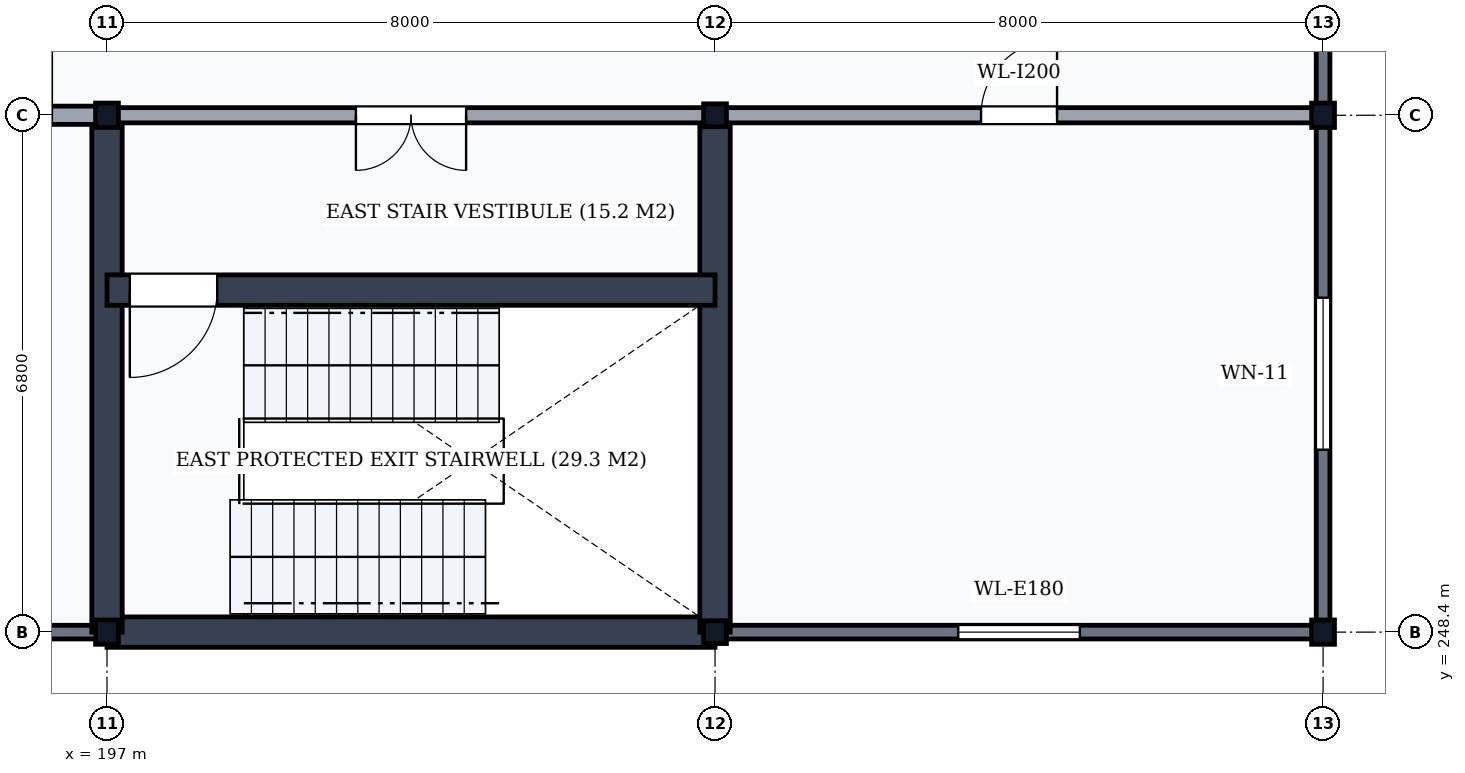
"""IFC4 building model, lengths in metres.
Left out: names, types, materials, properties, quantities, classifications, styles, units other than length and angle.
Written with IfcOpenShell. Run it as: python <this file> out.ifc"""

import sys

from ifc_helpers import new_model, si_unit, direction, frame, frame_2d, origin, origin_2d, place, context, subcontext, project, spatial, rectangle, i_section, extrude, element, fill, save


model = new_model("IFC4")
c1 = context("Model", 3, precision=1e-05, world=origin(), true_north=direction((0.0, 1.0)))
c2 = subcontext(c1, "Body", "Model", "MODEL_VIEW")
j1 = project(units=[si_unit("LENGTHUNIT", "METRE"), si_unit("PLANEANGLEUNIT", "RADIAN")], contexts=[c1])
p1 = place(None, origin())
s1 = spatial("IfcSite", under=j1, at=p1, CompositionType="ELEMENT")
p2 = place(p1, origin())
s2 = spatial("IfcBuilding", under=s1, at=p2, CompositionType="ELEMENT")
p3 = place(p2, frame((0.0, 0.0, 67.8)))
s3 = spatial("IfcBuildingStorey", under=s2, at=p3, CompositionType="ELEMENT", Elevation=67.8)
for number, where, z_axis, x_axis in (
    (1, (197.0, 248.4, 0.0), (0.0, 0.0, 1.0), (1.0, 0.0, 0.0)),
    (2, (197.0, 255.2, 0.0), (0.0, 0.0, 1.0), (1.0, 0.0, 0.0)),
):
    element("IfcColumn", number, at=place(p3, frame(where, z_axis=z_axis, x_axis=x_axis)), inside=s3, PredefinedType="COLUMN", context=c2, shape_type="SweptSolid", body=[
        extrude(i_section(OverallWidth=0.3, OverallDepth=0.32, WebThickness=0.011, FlangeThickness=0.021, FilletRadius=0.027, at=origin_2d()), origin(), (0.0, 0.0, 1.0), 4.5),
    ])
for number, where, z_axis, x_axis in (
    (3, (205.0, 248.4, 0.0), (0.0, 0.0, 1.0), (1.0, 0.0, 0.0)),
    (4, (205.0, 255.2, 0.0), (0.0, 0.0, 1.0), (1.0, 0.0, 0.0)),
):
    element("IfcColumn", number, at=place(p3, frame(where, z_axis=z_axis, x_axis=x_axis)), inside=s3, PredefinedType="COLUMN", context=c2, shape_type="SweptSolid", body=[
        extrude(i_section(OverallWidth=0.3, OverallDepth=0.3, WebThickness=0.011, FlangeThickness=0.019, FilletRadius=0.027, at=origin_2d()), origin(), (0.0, 0.0, 1.0), 4.5),
    ])
for number, where, z_axis, x_axis in (
    (5, (213.0, 248.4, 0.0), (0.0, 0.0, 1.0), (1.0, 0.0, 0.0)),
    (6, (213.0, 255.2, 0.0), (0.0, 0.0, 1.0), (1.0, 0.0, 0.0)),
):
    element("IfcColumn", number, at=place(p3, frame(where, z_axis=z_axis, x_axis=x_axis)), inside=s3, PredefinedType="COLUMN", context=c2, shape_type="SweptSolid", body=[
        extrude(i_section(OverallWidth=0.3, OverallDepth=0.32, WebThickness=0.011, FlangeThickness=0.021, FilletRadius=0.027, at=origin_2d()), origin(), (0.0, 0.0, 1.0), 4.5),
    ])
p4 = place(p3, frame((189.006, 248.4, 0.0), z_axis=(0.0, 0.0, 1.0), x_axis=(1.0, 0.0, 0.0)))
e7 = element("IfcWall", 7, at=p4, inside=s3, PredefinedType="SOLIDWALL", context=c2, shape_type="SweptSolid", body=[
    extrude(rectangle(XDim=7.988, YDim=0.18, at=frame_2d((3.994, 0.0))), origin(), (0.0, 0.0, 1.0), 3.988),
])
p5 = place(p3, frame((205.006, 248.4, 0.0), z_axis=(0.0, 0.0, 1.0), x_axis=(1.0, 0.0, 0.0)))
e8 = element("IfcWall", 8, at=p5, inside=s3, PredefinedType="SOLIDWALL", context=c2, shape_type="SweptSolid", body=[
    extrude(rectangle(XDim=7.988, YDim=0.18, at=frame_2d((3.994, 0.0))), origin(), (0.0, 0.0, 1.0), 3.988),
])
p6 = place(p5, frame((3.194, 0.0, 0.95)))
e9 = element("IfcOpeningElement", 9, at=p6, cuts=e8, PredefinedType="OPENING", context=c2, shape_type="SweptSolid", body=[
    extrude(rectangle(XDim=1.6, YDim=2.0, at=frame_2d((0.8, 1.0))), frame((0.0, 0.105, 0.0), z_axis=(0.0, -1.0, 0.0), x_axis=(1.0, 0.0, 0.0)), (0.0, 0.0, 1.0), 0.21),
])
p7 = place(p3, frame((213.0, 248.406, 0.0), z_axis=(0.0, 0.0, 1.0), x_axis=(0.0, 1.0, 0.0)))
e10 = element("IfcWall", 10, at=p7, inside=s3, PredefinedType="SOLIDWALL", context=c2, shape_type="SweptSolid", body=[
    extrude(rectangle(XDim=6.788, YDim=0.18, at=frame_2d((3.394, 0.0))), origin(), (0.0, 0.0, 1.0), 4.068),
])
p8 = place(p7, frame((2.394, 0.0, 0.95)))
e11 = element("IfcOpeningElement", 11, at=p8, cuts=e10, PredefinedType="OPENING", context=c2, shape_type="SweptSolid", body=[
    extrude(rectangle(XDim=2.0, YDim=2.1, at=frame_2d((1.0, 1.05))), frame((0.0, 0.105, 0.0), z_axis=(0.0, -1.0, 0.0), x_axis=(1.0, 0.0, 0.0)), (0.0, 0.0, 1.0), 0.21),
])
p9 = place(p3, frame((213.0, 255.206, 0.0), z_axis=(0.0, 0.0, 1.0), x_axis=(0.0, 1.0, 0.0)))
e12 = element("IfcWall", 12, at=p9, inside=s3, PredefinedType="SOLIDWALL", context=c2, shape_type="SweptSolid", body=[
    extrude(rectangle(XDim=7.588, YDim=0.18, at=frame_2d((3.794, 0.0))), origin(), (0.0, 0.0, 1.0), 4.028),
])
p10 = place(p3, frame((197.0, 248.4, 0.0), z_axis=(0.0, 0.0, 1.0), x_axis=(1.0, 0.0, 0.0)))
e13 = element("IfcWall", 13, at=p10, inside=s3, PredefinedType="SHEAR", context=c2, shape_type="SweptSolid", body=[
    extrude(rectangle(XDim=8.0, YDim=0.4, at=frame_2d((4.0, 0.0))), origin(), (0.0, 0.0, 1.0), 4.3),
])
for number, where, z_axis, x_axis in (
    (14, (197.0, 248.4, 0.0), (0.0, 0.0, 1.0), (0.0, 1.0, 0.0)),
    (15, (205.0, 248.4, 0.0), (0.0, 0.0, 1.0), (0.0, 1.0, 0.0)),
):
    element("IfcWall", number, at=place(p3, frame(where, z_axis=z_axis, x_axis=x_axis)), inside=s3, PredefinedType="SHEAR", context=c2, shape_type="SweptSolid", body=[
        extrude(rectangle(XDim=6.8, YDim=0.4, at=frame_2d((3.4, 0.0))), origin(), (0.0, 0.0, 1.0), 4.3),
    ])
p11 = place(p3, frame((197.0, 252.9, 0.0), z_axis=(0.0, 0.0, 1.0), x_axis=(1.0, 0.0, 0.0)))
e16 = element("IfcWall", 16, at=p11, inside=s3, PredefinedType="SHEAR", context=c2, shape_type="SweptSolid", body=[
    extrude(rectangle(XDim=8.0, YDim=0.4, at=frame_2d((4.0, 0.0))), origin(), (0.0, 0.0, 1.0), 4.3),
])
p12 = place(p11, frame((0.3, 0.0, 0.0)))
e17 = element("IfcOpeningElement", 17, at=p12, cuts=e16, PredefinedType="OPENING", context=c2, shape_type="SweptSolid", body=[
    extrude(rectangle(XDim=1.15, YDim=2.15, at=frame_2d((0.575, 1.075))), frame((0.0, 0.215, 0.0), z_axis=(0.0, -1.0, 0.0), x_axis=(1.0, 0.0, 0.0)), (0.0, 0.0, 1.0), 0.43),
])
p13 = place(p3, frame((197.0, 255.2, 0.0), z_axis=(0.0, 0.0, 1.0), x_axis=(1.0, 0.0, 0.0)))
e18 = element("IfcWall", 18, at=p13, inside=s3, PredefinedType="PARTITIONING", context=c2, shape_type="SweptSolid", body=[
    extrude(rectangle(XDim=8.0, YDim=0.2, at=frame_2d((4.0, 0.0))), origin(), (0.0, 0.0, 1.0), 3.798),
])
p14 = place(p13, frame((3.275, 0.0, 0.0)))
e19 = element("IfcOpeningElement", 19, at=p14, cuts=e18, PredefinedType="OPENING", context=c2, shape_type="SweptSolid", body=[
    extrude(rectangle(XDim=1.45, YDim=2.2, at=frame_2d((0.725, 1.1))), frame((0.0, 0.115, 0.0), z_axis=(0.0, -1.0, 0.0), x_axis=(1.0, 0.0, 0.0)), (0.0, 0.0, 1.0), 0.23),
])
p15 = place(p3, frame((189.0, 255.2, 0.0), z_axis=(0.0, 0.0, 1.0), x_axis=(1.0, 0.0, 0.0)))
e20 = element("IfcWall", 20, at=p15, inside=s3, PredefinedType="PARTITIONING", context=c2, shape_type="SweptSolid", body=[
    extrude(rectangle(XDim=8.0, YDim=0.24, at=frame_2d((4.0, 0.0))), origin(), (0.0, 0.0, 1.0), 3.798),
])
p16 = place(p15, frame((1.05, 0.0, 0.0)))
e21 = element("IfcOpeningElement", 21, at=p16, cuts=e20, PredefinedType="OPENING", context=c2, shape_type="SweptSolid", body=[
    extrude(rectangle(XDim=1.0, YDim=2.1, at=frame_2d((0.5, 1.05))), frame((0.0, 0.135, 0.0), z_axis=(0.0, -1.0, 0.0), x_axis=(1.0, 0.0, 0.0)), (0.0, 0.0, 1.0), 0.27),
])
p17 = place(p15, frame((3.6, 0.0, 0.0)))
e22 = element("IfcOpeningElement", 22, at=p17, cuts=e20, PredefinedType="OPENING", context=c2, shape_type="SweptSolid", body=[
    extrude(rectangle(XDim=1.5, YDim=2.25, at=frame_2d((0.75, 1.125))), frame((0.0, 0.135, 0.0), z_axis=(0.0, -1.0, 0.0), x_axis=(1.0, 0.0, 0.0)), (0.0, 0.0, 1.0), 0.27),
])
p18 = place(p15, frame((6.425, 0.0, 0.0)))
e23 = element("IfcOpeningElement", 23, at=p18, cuts=e20, PredefinedType="OPENING", context=c2, shape_type="SweptSolid", body=[
    extrude(rectangle(XDim=0.85, YDim=2.1, at=frame_2d((0.425, 1.05))), frame((0.0, 0.135, 0.0), z_axis=(0.0, -1.0, 0.0), x_axis=(1.0, 0.0, 0.0)), (0.0, 0.0, 1.0), 0.27),
])
p19 = place(p3, frame((205.0, 255.2, 0.0), z_axis=(0.0, 0.0, 1.0), x_axis=(1.0, 0.0, 0.0)))
e24 = element("IfcWall", 24, at=p19, inside=s3, PredefinedType="PARTITIONING", context=c2, shape_type="SweptSolid", body=[
    extrude(rectangle(XDim=8.0, YDim=0.2, at=frame_2d((4.0, 0.0))), origin(), (0.0, 0.0, 1.0), 3.798),
])
p20 = place(p19, frame((3.5, 0.0, 0.0)))
e25 = element("IfcOpeningElement", 25, at=p20, cuts=e24, PredefinedType="OPENING", context=c2, shape_type="SweptSolid", body=[
    extrude(rectangle(XDim=1.0, YDim=2.1, at=frame_2d((0.5, 1.05))), frame((0.0, 0.115, 0.0), z_axis=(0.0, -1.0, 0.0), x_axis=(1.0, 0.0, 0.0)), (0.0, 0.0, 1.0), 0.23),
])
p21 = place(p6, origin())
e26 = element("IfcWindow", 26, at=p21, inside=s3, PartitioningType="SINGLE_PANEL", PredefinedType="WINDOW", context=c2, shape_type="SweptSolid", body=[
    extrude(rectangle(XDim=1.6, YDim=2.0, at=frame_2d((0.8, 1.0))), frame((0.0, 0.03, 0.0), z_axis=(0.0, -1.0, 0.0), x_axis=(1.0, 0.0, 0.0)), (0.0, 0.0, 1.0), 0.06),
])
fill(e9, e26)
p22 = place(p8, origin())
e27 = element("IfcWindow", 27, at=p22, inside=s3, PartitioningType="DOUBLE_PANEL_VERTICAL", PredefinedType="WINDOW", context=c2, shape_type="SweptSolid", body=[
    extrude(rectangle(XDim=2.0, YDim=2.1, at=frame_2d((1.0, 1.05))), frame((0.0, 0.03, 0.0), z_axis=(0.0, -1.0, 0.0), x_axis=(1.0, 0.0, 0.0)), (0.0, 0.0, 1.0), 0.06),
])
fill(e11, e27)
p23 = place(p12, frame((1.15, 0.0, 0.0), z_axis=(0.0, 0.0, 1.0), x_axis=(-1.0, 0.0, 0.0)))
e28 = element("IfcDoor", 28, at=p23, inside=s3, OperationType="SINGLE_SWING_RIGHT", PredefinedType="DOOR", context=c2, shape_type="SweptSolid", body=[
    extrude(rectangle(XDim=1.15, YDim=2.15, at=frame_2d((0.575, 1.075))), frame((0.0, 0.025, 0.0), z_axis=(0.0, -1.0, 0.0), x_axis=(1.0, 0.0, 0.0)), (0.0, 0.0, 1.0), 0.05),
])
fill(e17, e28)
p24 = place(p14, frame((1.45, 0.0, 0.0), z_axis=(0.0, 0.0, 1.0), x_axis=(-1.0, 0.0, 0.0)))
e29 = element("IfcDoor", 29, at=p24, inside=s3, OperationType="DOUBLE_DOOR_SINGLE_SWING", PredefinedType="DOOR", context=c2, shape_type="SweptSolid", body=[
    extrude(rectangle(XDim=1.45, YDim=2.2, at=frame_2d((0.725, 1.1))), frame((0.0, 0.025, 0.0), z_axis=(0.0, -1.0, 0.0), x_axis=(1.0, 0.0, 0.0)), (0.0, 0.0, 1.0), 0.05),
])
fill(e19, e29)
p25 = place(p20, frame((1.0, 0.0, 0.0), z_axis=(0.0, 0.0, 1.0), x_axis=(-1.0, 0.0, 0.0)))
e30 = element("IfcDoor", 30, at=p25, inside=s3, OperationType="SINGLE_SWING_LEFT", PredefinedType="DOOR", context=c2, shape_type="SweptSolid", body=[
    extrude(rectangle(XDim=1.0, YDim=2.1, at=frame_2d((0.5, 1.05))), frame((0.0, 0.025, 0.0), z_axis=(0.0, -1.0, 0.0), x_axis=(1.0, 0.0, 0.0)), (0.0, 0.0, 1.0), 0.05),
])
fill(e25, e30)
save(model, sys.argv[1])
